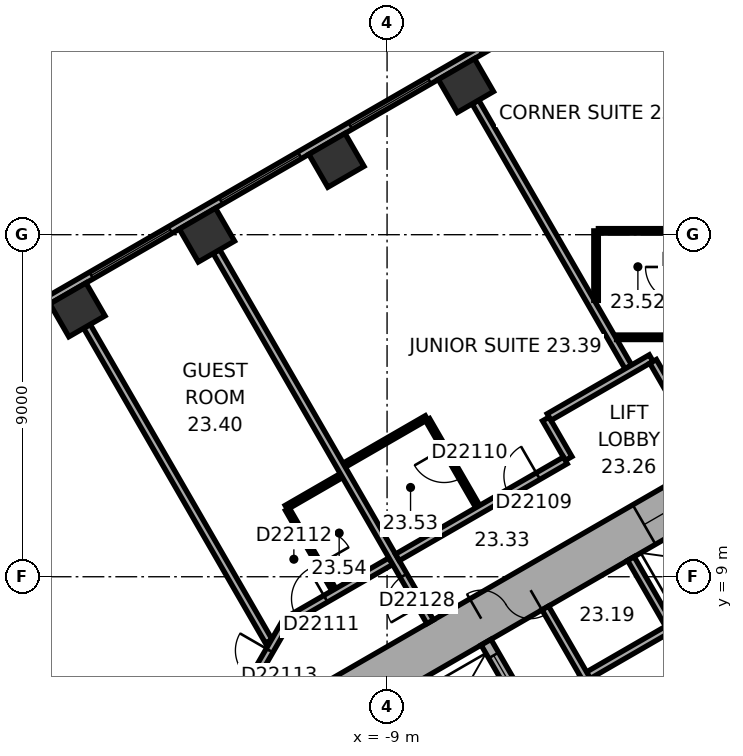
"""IFC4 building model, lengths in metres.
Left out: names, types, materials, properties, quantities, classifications, styles, units other than length and angle.
Written with IfcOpenShell. Run it as: python <this file> out.ifc"""

import sys

from ifc_helpers import new_model, si_unit, direction, frame, frame_2d, origin, origin_2d, place, context, subcontext, project, spatial, rectangle, extrude, element, fill, save


model = new_model("IFC4")
c1 = context("Model", 3, precision=1e-05, world=origin(), true_north=direction((0.0, 1.0)))
c2 = subcontext(c1, "Body", "Model", "MODEL_VIEW")
j1 = project(units=[si_unit("LENGTHUNIT", "METRE"), si_unit("PLANEANGLEUNIT", "RADIAN")], contexts=[c1])
p1 = place(None, origin())
s1 = spatial("IfcSite", under=j1, at=p1, CompositionType="ELEMENT")
p2 = place(p1, origin())
s2 = spatial("IfcBuilding", under=s1, at=p2, CompositionType="ELEMENT")
p3 = place(p2, frame((0.0, 0.0, 100.1)))
s3 = spatial("IfcBuildingStorey", under=s2, at=p3, CompositionType="ELEMENT", Elevation=100.1)
for number, where, z_axis, x_axis in (
    (1, (-6.926, 21.925, 0.0), (0.0, 0.0, 1.0), (-0.866, -0.5, 0.0)),
    (2, (-10.333, 19.957, 0.0), (0.0, 0.0, 1.0), (-0.866, -0.5, 0.0)),
    (3, (-13.74, 17.99, 0.0), (0.0, 0.0, 1.0), (-0.866, -0.5, 0.0)),
    (4, (-17.148, 16.023, 0.0), (0.0, 0.0, 1.0), (-0.866, -0.5, 0.0)),
):
    element("IfcColumn", number, at=place(p3, frame(where, z_axis=z_axis, x_axis=x_axis)), inside=s3, PredefinedType="COLUMN", context=c2, shape_type="SweptSolid", body=[
        extrude(rectangle(XDim=1.1, YDim=1.0, at=origin_2d()), origin(), (0.0, 0.0, 1.0), 3.3),
    ])
p4 = place(p3, frame((0.3, 11.836, 0.0), z_axis=(0.0, 0.0, 1.0), x_axis=(-0.866021384402, -0.500006961711, 0.0)))
e5 = element("IfcWall", 5, at=p4, inside=s3, PredefinedType="SHEAR", context=c2, shape_type="SweptSolid", body=[
    extrude(rectangle(XDim=12.355, YDim=1.2, at=frame_2d((6.178, 0.0))), origin(), (0.0, 0.0, 1.0), 3.3),
])
p5 = place(p4, frame((6.378, 0.0, 0.0)))
e6 = element("IfcOpeningElement", 6, at=p5, cuts=e5, PredefinedType="OPENING", context=c2, shape_type="SweptSolid", body=[
    extrude(rectangle(XDim=1.5, YDim=2.1, at=frame_2d((0.75, 1.05))), frame((0.0, 0.61, 0.0), z_axis=(0.0, -1.0, 0.0), x_axis=(1.0, 0.0, 0.0)), (0.0, 0.0, 1.0), 1.22),
])
p6 = place(p4, frame((1.828, 0.0, 0.0)))
e7 = element("IfcOpeningElement", 7, at=p6, cuts=e5, PredefinedType="OPENING", context=c2, shape_type="SweptSolid", body=[
    extrude(rectangle(XDim=1.1, YDim=2.1, at=frame_2d((0.55, 1.05))), frame((0.0, 0.61, 0.0), z_axis=(0.0, -1.0, 0.0), x_axis=(1.0, 0.0, 0.0)), (0.0, 0.0, 1.0), 1.22),
])
p7 = place(p3, frame((-3.136, 24.805, 0.0), z_axis=(0.0, 0.0, 1.0), x_axis=(-0.866028291626, -0.499994998079, 0.0)))
e8 = element("IfcWall", 8, at=p7, inside=s3, PredefinedType="STANDARD", context=c2, shape_type="SweptSolid", body=[
    extrude(rectangle(XDim=21.246, YDim=0.2, at=frame_2d((10.623, 0.0))), origin(), (0.0, 0.0, 1.0), 3.3),
])
p8 = place(p7, frame((1.555, 0.0, 0.8)))
e9 = element("IfcOpeningElement", 9, at=p8, cuts=e8, PredefinedType="OPENING", context=c2, shape_type="SweptSolid", body=[
    extrude(rectangle(XDim=2.4, YDim=1.7, at=frame_2d((1.2, 0.85))), frame((0.0, 0.11, 0.0), z_axis=(0.0, -1.0, 0.0), x_axis=(1.0, 0.0, 0.0)), (0.0, 0.0, 1.0), 0.22),
])
p9 = place(p7, frame((5.489, 0.0, 0.8)))
e10 = element("IfcOpeningElement", 10, at=p9, cuts=e8, PredefinedType="OPENING", context=c2, shape_type="SweptSolid", body=[
    extrude(rectangle(XDim=2.4, YDim=1.7, at=frame_2d((1.2, 0.85))), frame((0.0, 0.11, 0.0), z_axis=(0.0, -1.0, 0.0), x_axis=(1.0, 0.0, 0.0)), (0.0, 0.0, 1.0), 0.22),
])
p10 = place(p7, frame((9.424, 0.0, 0.8)))
e11 = element("IfcOpeningElement", 11, at=p10, cuts=e8, PredefinedType="OPENING", context=c2, shape_type="SweptSolid", body=[
    extrude(rectangle(XDim=2.4, YDim=1.7, at=frame_2d((1.2, 0.85))), frame((0.0, 0.11, 0.0), z_axis=(0.0, -1.0, 0.0), x_axis=(1.0, 0.0, 0.0)), (0.0, 0.0, 1.0), 0.22),
])
p11 = place(p7, frame((13.358, 0.0, 0.8)))
e12 = element("IfcOpeningElement", 12, at=p11, cuts=e8, PredefinedType="OPENING", context=c2, shape_type="SweptSolid", body=[
    extrude(rectangle(XDim=2.4, YDim=1.7, at=frame_2d((1.2, 0.85))), frame((0.0, 0.11, 0.0), z_axis=(0.0, -1.0, 0.0), x_axis=(1.0, 0.0, 0.0)), (0.0, 0.0, 1.0), 0.22),
])
p12 = place(p7, frame((17.293, 0.0, 0.8)))
e13 = element("IfcOpeningElement", 13, at=p12, cuts=e8, PredefinedType="OPENING", context=c2, shape_type="SweptSolid", body=[
    extrude(rectangle(XDim=2.4, YDim=1.7, at=frame_2d((1.2, 0.85))), frame((0.0, 0.11, 0.0), z_axis=(0.0, -1.0, 0.0), x_axis=(1.0, 0.0, 0.0)), (0.0, 0.0, 1.0), 0.22),
])
p13 = place(p3, frame((0.803, 9.009, 0.0), z_axis=(0.0, 0.0, 1.0), x_axis=(-0.866028230842, -0.499995103361, 0.0)))
e14 = element("IfcWall", 14, at=p13, inside=s3, PredefinedType="PARTITIONING", context=c2, shape_type="SweptSolid", body=[
    extrude(rectangle(XDim=5.4, YDim=0.2, at=frame_2d((2.7, 0.0))), origin(), (0.0, 0.0, 1.0), 3.05),
])
for number, where, z_axis, x_axis in (
    (15, (-1.485, 7.572, 0.0), (0.0, 0.0, 1.0), (-0.5, 0.866, 0.0)),
    (16, (-3.737, 6.272, 0.0), (0.0, 0.0, 1.0), (-0.5, 0.866, 0.0)),
):
    element("IfcWall", number, at=place(p3, frame(where, z_axis=z_axis, x_axis=x_axis)), inside=s3, PredefinedType="PARTITIONING", context=c2, shape_type="SweptSolid", body=[
        extrude(rectangle(XDim=2.2, YDim=0.2, at=frame_2d((1.1, 0.0))), origin(), (0.0, 0.0, 1.0), 3.05),
    ])
p14 = place(p3, frame((-2.216, 4.282, 0.0), z_axis=(0.0, 0.0, 1.0), x_axis=(0.499977259774, 0.866038532462, 0.0)))
e17 = element("IfcWall", 17, at=p14, inside=s3, PredefinedType="SHEAR", context=c2, shape_type="SweptSolid", body=[
    extrude(rectangle(XDim=4.7, YDim=0.3, at=frame_2d((2.35, 0.0))), origin(), (0.0, 0.0, 1.0), 3.05),
])
p15 = place(p3, frame((-5.295, 5.372, 0.0), z_axis=(0.0, 0.0, 1.0), x_axis=(-0.500077893725, 0.86598042715, 0.0)))
e18 = element("IfcWall", 18, at=p15, inside=s3, PredefinedType="SHEAR", context=c2, shape_type="SweptSolid", body=[
    extrude(rectangle(XDim=2.2, YDim=0.3, at=frame_2d((1.1, 0.0))), origin(), (0.0, 0.0, 1.0), 3.05),
])
p16 = place(p15, frame((0.7, 0.0, 0.0)))
e19 = element("IfcOpeningElement", 19, at=p16, cuts=e18, PredefinedType="OPENING", context=c2, shape_type="SweptSolid", body=[
    extrude(rectangle(XDim=1.1, YDim=2.1, at=frame_2d((0.55, 1.05))), frame((0.0, 0.16, 0.0), z_axis=(0.0, -1.0, 0.0), x_axis=(1.0, 0.0, 0.0)), (0.0, 0.0, 1.0), 0.32),
])
p17 = place(p3, frame((-16.898, 15.59, 0.0), z_axis=(0.0, 0.0, 1.0), x_axis=(0.500023458698, -0.866011859475, 0.0)))
e20 = element("IfcWall", 20, at=p17, inside=s3, PredefinedType="PARTITIONING", context=c2, shape_type="SweptSolid", body=[
    extrude(rectangle(XDim=9.572, YDim=0.2, at=frame_2d((4.786, 0.0))), origin(), (0.0, 0.0, 1.0), 3.05),
])
p18 = place(p3, frame((-11.65, 7.823, 0.0), z_axis=(0.0, 0.0, 1.0), x_axis=(-0.500063520245, -0.865988727248, 0.0)))
e21 = element("IfcWall", 21, at=p18, inside=s3, PredefinedType="PARTITIONING", context=c2, shape_type="SweptSolid", body=[
    extrude(rectangle(XDim=1.9, YDim=0.2, at=frame_2d((0.95, 0.0))), origin(), (0.0, 0.0, 1.0), 3.05),
])
p19 = place(p18, frame((0.882, 0.0, 0.0)))
e22 = element("IfcOpeningElement", 22, at=p19, cuts=e21, PredefinedType="OPENING", context=c2, shape_type="SweptSolid", body=[
    extrude(rectangle(XDim=0.9, YDim=2.1, at=frame_2d((0.45, 1.05))), frame((0.0, 0.11, 0.0), z_axis=(0.0, -1.0, 0.0), x_axis=(1.0, 0.0, 0.0)), (0.0, 0.0, 1.0), 0.22),
])
p20 = place(p3, frame((-11.651, 10.825, 0.0), z_axis=(0.0, 0.0, 1.0), x_axis=(0.865998477143, 0.500046635412, 0.0)))
e23 = element("IfcWall", 23, at=p20, inside=s3, PredefinedType="PARTITIONING", context=c2, shape_type="SweptSolid", body=[
    extrude(rectangle(XDim=1.673, YDim=0.12, at=frame_2d((0.836, 0.0))), origin(), (0.0, 0.0, 1.0), 3.05),
])
p21 = place(p3, frame((-10.401, 8.66, 0.0), z_axis=(0.0, 0.0, 1.0), x_axis=(-0.500077547548, 0.865980627057, 0.0)))
e24 = element("IfcWall", 24, at=p21, inside=s3, PredefinedType="PARTITIONING", context=c2, shape_type="SweptSolid", body=[
    extrude(rectangle(XDim=2.44, YDim=0.12, at=frame_2d((1.22, 0.0))), origin(), (0.0, 0.0, 1.0), 3.05),
])
p22 = place(p21, frame((0.77, 0.0, 0.0)))
e25 = element("IfcOpeningElement", 25, at=p22, cuts=e24, PredefinedType="OPENING", context=c2, shape_type="SweptSolid", body=[
    extrude(rectangle(XDim=0.9, YDim=2.1, at=frame_2d((0.45, 1.05))), frame((0.0, 0.07, 0.0), z_axis=(0.0, -1.0, 0.0), x_axis=(1.0, 0.0, 0.0)), (0.0, 0.0, 1.0), 0.14),
])
p23 = place(p3, frame((-10.129, 11.935, 0.0), z_axis=(0.0, 0.0, 1.0), x_axis=(0.866047370643, 0.499961950354, 0.0)))
e26 = element("IfcWall", 26, at=p23, inside=s3, PredefinedType="PARTITIONING", context=c2, shape_type="SweptSolid", body=[
    extrude(rectangle(XDim=2.5, YDim=0.12, at=frame_2d((1.25, 0.0))), origin(), (0.0, 0.0, 1.0), 3.05),
])
p24 = place(p3, frame((-8.902, 9.41, 0.0), z_axis=(0.0, 0.0, 1.0), x_axis=(-0.866014299198, -0.500019233215, 0.0)))
e27 = element("IfcWall", 27, at=p24, inside=s3, PredefinedType="PARTITIONING", context=c2, shape_type="SweptSolid", body=[
    extrude(rectangle(XDim=3.133, YDim=0.2, at=frame_2d((1.567, 0.0))), origin(), (0.0, 0.0, 1.0), 3.05),
])
p25 = place(p24, frame((1.978, 0.0, 0.0)))
e28 = element("IfcOpeningElement", 28, at=p25, cuts=e27, PredefinedType="OPENING", context=c2, shape_type="SweptSolid", body=[
    extrude(rectangle(XDim=0.9, YDim=2.1, at=frame_2d((0.45, 1.05))), frame((0.0, 0.11, 0.0), z_axis=(0.0, -1.0, 0.0), x_axis=(1.0, 0.0, 0.0)), (0.0, 0.0, 1.0), 0.22),
])
p26 = place(p3, frame((-7.934, 13.133, 0.0), z_axis=(0.0, 0.0, 1.0), x_axis=(0.499938597367, -0.866060851709, 0.0)))
e29 = element("IfcWall", 29, at=p26, inside=s3, PredefinedType="PARTITIONING", context=c2, shape_type="SweptSolid", body=[
    extrude(rectangle(XDim=2.64, YDim=0.12, at=frame_2d((1.32, 0.0))), origin(), (0.0, 0.0, 1.0), 3.05),
])
p27 = place(p26, frame((0.87, 0.0, 0.0)))
e30 = element("IfcOpeningElement", 30, at=p27, cuts=e29, PredefinedType="OPENING", context=c2, shape_type="SweptSolid", body=[
    extrude(rectangle(XDim=0.9, YDim=2.1, at=frame_2d((0.45, 1.05))), frame((0.0, 0.07, 0.0), z_axis=(0.0, -1.0, 0.0), x_axis=(1.0, 0.0, 0.0)), (0.0, 0.0, 1.0), 0.14),
])
p28 = place(p3, frame((-7.865, 7.814, 0.0), z_axis=(0.0, 0.0, 1.0), x_axis=(-0.500004234368, 0.866022959057, 0.0)))
e31 = element("IfcWall", 31, at=p28, inside=s3, PredefinedType="PARTITIONING", context=c2, shape_type="SweptSolid", body=[
    extrude(rectangle(XDim=11.25, YDim=0.2, at=frame_2d((5.625, 0.0))), origin(), (0.0, 0.0, 1.0), 3.05),
])
p29 = place(p28, frame((0.5, 0.0, 0.0)))
e32 = element("IfcOpeningElement", 32, at=p29, cuts=e31, PredefinedType="OPENING", context=c2, shape_type="SweptSolid", body=[
    extrude(rectangle(XDim=0.9, YDim=2.1, at=frame_2d((0.45, 1.05))), frame((0.0, 0.11, 0.0), z_axis=(0.0, -1.0, 0.0), x_axis=(1.0, 0.0, 0.0)), (0.0, 0.0, 1.0), 0.22),
])
p30 = place(p3, frame((-6.676, 21.492, 0.0), z_axis=(0.0, 0.0, 1.0), x_axis=(0.500011263043, -0.866018900966, 0.0)))
e33 = element("IfcWall", 33, at=p30, inside=s3, PredefinedType="PARTITIONING", context=c2, shape_type="SweptSolid", body=[
    extrude(rectangle(XDim=8.049, YDim=0.2, at=frame_2d((4.024, 0.0))), origin(), (0.0, 0.0, 1.0), 3.05),
])
p31 = place(p3, frame((-4.823, 13.152, 0.0), z_axis=(0.0, 0.0, 1.0), x_axis=(0.499986357472, -0.866033280158, 0.0)))
e34 = element("IfcWall", 34, at=p31, inside=s3, PredefinedType="PARTITIONING", context=c2, shape_type="SweptSolid", body=[
    extrude(rectangle(XDim=1.201, YDim=0.2, at=frame_2d((0.601, 0.0))), origin(), (0.0, 0.0, 1.0), 3.05),
])
p32 = place(p3, frame((-4.309, 12.061, 0.0), z_axis=(0.0, 0.0, 1.0), x_axis=(-0.866020679205, -0.500008183122, 0.0)))
e35 = element("IfcWall", 35, at=p32, inside=s3, PredefinedType="PARTITIONING", context=c2, shape_type="SweptSolid", body=[
    extrude(rectangle(XDim=5.104, YDim=0.2, at=frame_2d((2.552, 0.0))), origin(), (0.0, 0.0, 1.0), 3.05),
])
p33 = place(p32, frame((0.827, 0.0, 0.0)))
e36 = element("IfcOpeningElement", 36, at=p33, cuts=e35, PredefinedType="OPENING", context=c2, shape_type="SweptSolid", body=[
    extrude(rectangle(XDim=0.9, YDim=2.1, at=frame_2d((0.45, 1.05))), frame((0.0, 0.11, 0.0), z_axis=(0.0, -1.0, 0.0), x_axis=(1.0, 0.0, 0.0)), (0.0, 0.0, 1.0), 0.22),
])
p34 = place(p3, frame((-3.5, 16.271, 0.0), z_axis=(0.0, 0.0, 1.0), x_axis=(0.0, 1.0, 0.0)))
e37 = element("IfcWall", 37, at=p34, inside=s3, PredefinedType="PARTITIONING", context=c2, shape_type="SweptSolid", body=[
    extrude(rectangle(XDim=1.829, YDim=0.12, at=frame_2d((0.915, 0.0))), origin(), (0.0, 0.0, 1.0), 3.05),
])
p35 = place(p3, frame((-3.44, 18.101, 0.0), z_axis=(0.0, 0.0, 1.0), x_axis=(1.0, 0.0, 0.0)))
e38 = element("IfcWall", 38, at=p35, inside=s3, PredefinedType="PARTITIONING", context=c2, shape_type="SweptSolid", body=[
    extrude(rectangle(XDim=2.14, YDim=0.12, at=frame_2d((1.07, 0.0))), origin(), (0.0, 0.0, 1.0), 3.05),
])
p36 = place(p3, frame((-2.05, 14.752, 0.0), z_axis=(0.0, 0.0, 1.0), x_axis=(-0.866030936828, -0.499990416364, 0.0)))
e39 = element("IfcWall", 39, at=p36, inside=s3, PredefinedType="PARTITIONING", context=c2, shape_type="SweptSolid", body=[
    extrude(rectangle(XDim=3.102, YDim=0.2, at=frame_2d((1.551, 0.0))), origin(), (0.0, 0.0, 1.0), 3.05),
])
p37 = place(p3, frame((-1.449, 13.712, 0.0), z_axis=(0.0, 0.0, 1.0), x_axis=(-0.499978356969, 0.866037899034, 0.0)))
e40 = element("IfcWall", 40, at=p37, inside=s3, PredefinedType="PARTITIONING", context=c2, shape_type="SweptSolid", body=[
    extrude(rectangle(XDim=1.101, YDim=0.2, at=frame_2d((0.551, 0.0))), origin(), (0.0, 0.0, 1.0), 3.05),
])
p38 = place(p3, frame((-1.3, 15.301, 0.0), z_axis=(0.0, 0.0, 1.0), x_axis=(-1.0, 0.0, 0.0)))
e41 = element("IfcWall", 41, at=p38, inside=s3, PredefinedType="PARTITIONING", context=c2, shape_type="SweptSolid", body=[
    extrude(rectangle(XDim=1.661, YDim=0.12, at=frame_2d((0.831, 0.0))), origin(), (0.0, 0.0, 1.0), 3.05),
])
p39 = place(p9, origin())
e42 = element("IfcWindow", 42, at=p39, inside=s3, PartitioningType="SINGLE_PANEL", PredefinedType="WINDOW", context=c2, shape_type="SweptSolid", body=[
    extrude(rectangle(XDim=2.4, YDim=1.7, at=frame_2d((1.2, 0.85))), frame((0.0, 0.03, 0.0), z_axis=(0.0, -1.0, 0.0), x_axis=(1.0, 0.0, 0.0)), (0.0, 0.0, 1.0), 0.06),
])
fill(e10, e42)
p40 = place(p10, origin())
e43 = element("IfcWindow", 43, at=p40, inside=s3, PartitioningType="SINGLE_PANEL", PredefinedType="WINDOW", context=c2, shape_type="SweptSolid", body=[
    extrude(rectangle(XDim=2.4, YDim=1.7, at=frame_2d((1.2, 0.85))), frame((0.0, 0.03, 0.0), z_axis=(0.0, -1.0, 0.0), x_axis=(1.0, 0.0, 0.0)), (0.0, 0.0, 1.0), 0.06),
])
fill(e11, e43)
p41 = place(p11, origin())
e44 = element("IfcWindow", 44, at=p41, inside=s3, PartitioningType="SINGLE_PANEL", PredefinedType="WINDOW", context=c2, shape_type="SweptSolid", body=[
    extrude(rectangle(XDim=2.4, YDim=1.7, at=frame_2d((1.2, 0.85))), frame((0.0, 0.03, 0.0), z_axis=(0.0, -1.0, 0.0), x_axis=(1.0, 0.0, 0.0)), (0.0, 0.0, 1.0), 0.06),
])
fill(e12, e44)
p42 = place(p5, origin())
e45 = element("IfcDoor", 45, at=p42, inside=s3, OperationType="DOUBLE_DOOR_SINGLE_SWING", PredefinedType="DOOR", context=c2, shape_type="SweptSolid", body=[
    extrude(rectangle(XDim=1.5, YDim=2.1, at=frame_2d((0.75, 1.05))), frame((0.0, 0.025, 0.0), z_axis=(0.0, -1.0, 0.0), x_axis=(1.0, 0.0, 0.0)), (0.0, 0.0, 1.0), 0.05),
])
fill(e6, e45)
p43 = place(p16, origin())
e46 = element("IfcDoor", 46, at=p43, inside=s3, OperationType="DOUBLE_DOOR_SLIDING", PredefinedType="DOOR", context=c2, shape_type="SweptSolid", body=[
    extrude(rectangle(XDim=1.1, YDim=2.1, at=frame_2d((0.55, 1.05))), frame((0.0, 0.025, 0.0), z_axis=(0.0, -1.0, 0.0), x_axis=(1.0, 0.0, 0.0)), (0.0, 0.0, 1.0), 0.05),
])
fill(e19, e46)
p44 = place(p6, origin())
e47 = element("IfcDoor", 47, at=p44, inside=s3, OperationType="DOUBLE_DOOR_SLIDING", PredefinedType="DOOR", context=c2, shape_type="SweptSolid", body=[
    extrude(rectangle(XDim=1.1, YDim=2.1, at=frame_2d((0.55, 1.05))), frame((0.0, 0.025, 0.0), z_axis=(0.0, -1.0, 0.0), x_axis=(1.0, 0.0, 0.0)), (0.0, 0.0, 1.0), 0.05),
])
fill(e7, e47)
p45 = place(p33, origin())
e48 = element("IfcDoor", 48, at=p45, inside=s3, OperationType="SINGLE_SWING_LEFT", PredefinedType="DOOR", context=c2, shape_type="SweptSolid", body=[
    extrude(rectangle(XDim=0.9, YDim=2.1, at=frame_2d((0.45, 1.05))), frame((0.0, 0.025, 0.0), z_axis=(0.0, -1.0, 0.0), x_axis=(1.0, 0.0, 0.0)), (0.0, 0.0, 1.0), 0.05),
])
fill(e36, e48)
p46 = place(p27, origin())
e49 = element("IfcDoor", 49, at=p46, inside=s3, OperationType="SINGLE_SWING_LEFT", PredefinedType="DOOR", context=c2, shape_type="SweptSolid", body=[
    extrude(rectangle(XDim=0.9, YDim=2.1, at=frame_2d((0.45, 1.05))), frame((0.0, 0.025, 0.0), z_axis=(0.0, -1.0, 0.0), x_axis=(1.0, 0.0, 0.0)), (0.0, 0.0, 1.0), 0.05),
])
fill(e30, e49)
p47 = place(p25, origin())
e50 = element("IfcDoor", 50, at=p47, inside=s3, OperationType="SINGLE_SWING_LEFT", PredefinedType="DOOR", context=c2, shape_type="SweptSolid", body=[
    extrude(rectangle(XDim=0.9, YDim=2.1, at=frame_2d((0.45, 1.05))), frame((0.0, 0.025, 0.0), z_axis=(0.0, -1.0, 0.0), x_axis=(1.0, 0.0, 0.0)), (0.0, 0.0, 1.0), 0.05),
])
fill(e28, e50)
p48 = place(p22, origin())
e51 = element("IfcDoor", 51, at=p48, inside=s3, OperationType="SINGLE_SWING_LEFT", PredefinedType="DOOR", context=c2, shape_type="SweptSolid", body=[
    extrude(rectangle(XDim=0.9, YDim=2.1, at=frame_2d((0.45, 1.05))), frame((0.0, 0.025, 0.0), z_axis=(0.0, -1.0, 0.0), x_axis=(1.0, 0.0, 0.0)), (0.0, 0.0, 1.0), 0.05),
])
fill(e25, e51)
p49 = place(p19, origin())
e52 = element("IfcDoor", 52, at=p49, inside=s3, OperationType="SINGLE_SWING_LEFT", PredefinedType="DOOR", context=c2, shape_type="SweptSolid", body=[
    extrude(rectangle(XDim=0.9, YDim=2.1, at=frame_2d((0.45, 1.05))), frame((0.0, 0.025, 0.0), z_axis=(0.0, -1.0, 0.0), x_axis=(1.0, 0.0, 0.0)), (0.0, 0.0, 1.0), 0.05),
])
fill(e22, e52)
p50 = place(p29, origin())
e53 = element("IfcDoor", 53, at=p50, inside=s3, OperationType="SINGLE_SWING_LEFT", PredefinedType="DOOR", context=c2, shape_type="SweptSolid", body=[
    extrude(rectangle(XDim=0.9, YDim=2.1, at=frame_2d((0.45, 1.05))), frame((0.0, 0.025, 0.0), z_axis=(0.0, -1.0, 0.0), x_axis=(1.0, 0.0, 0.0)), (0.0, 0.0, 1.0), 0.05),
])
fill(e32, e53)
save(model, sys.argv[1])
